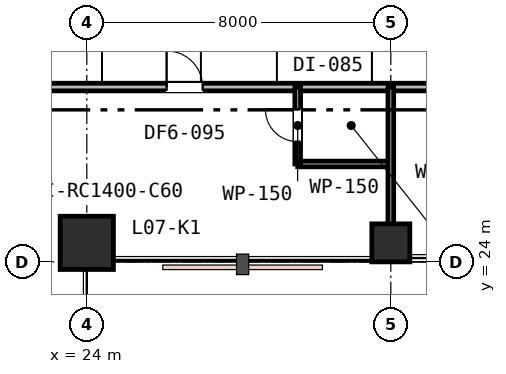
"""IFC4 building model, lengths in metres.
Left out: names, types, materials, properties, quantities, classifications, styles, units other than length and angle.
Written with IfcOpenShell. Run it as: python <this file> out.ifc"""

import sys

from ifc_helpers import new_model, si_unit, direction, frame, frame_2d, origin, origin_2d, place, context, subcontext, project, spatial, rectangle, extrude, element, fill, save


model = new_model("IFC4")
c1 = context("Model", 3, precision=1e-05, world=origin(), true_north=direction((0.0, 1.0)))
c2 = subcontext(c1, "Body", "Model", "MODEL_VIEW")
j1 = project(units=[si_unit("LENGTHUNIT", "METRE"), si_unit("PLANEANGLEUNIT", "RADIAN")], contexts=[c1])
p1 = place(None, origin())
s1 = spatial("IfcSite", under=j1, at=p1, CompositionType="ELEMENT")
p2 = place(p1, origin())
s2 = spatial("IfcBuilding", under=s1, at=p2, CompositionType="ELEMENT")
p3 = place(p2, frame((0.0, 0.0, 33.0)))
s3 = spatial("IfcBuildingStorey", under=s2, at=p3, CompositionType="ELEMENT", Elevation=33.0)
p4 = place(p3, frame((24.0, 24.5, 0.0), z_axis=(0.0, 0.0, 1.0), x_axis=(1.0, 0.0, 0.0)))
e1 = element("IfcColumn", 1, at=p4, inside=s3, PredefinedType="COLUMN", context=c2, shape_type="SweptSolid", body=[
    extrude(rectangle(XDim=1.4, YDim=1.4, at=origin_2d()), origin(), (0.0, 0.0, 1.0), 3.6),
])
p5 = place(p3, frame((32.0, 24.5, 0.0), z_axis=(0.0, 0.0, 1.0), x_axis=(1.0, 0.0, 0.0)))
e2 = element("IfcColumn", 2, at=p5, inside=s3, PredefinedType="COLUMN", context=c2, shape_type="SweptSolid", body=[
    extrude(rectangle(XDim=1.0, YDim=1.0, at=origin_2d()), origin(), (0.0, 0.0, 1.0), 3.6),
])
p6 = place(p3, frame((13.8, 28.6, 0.0), z_axis=(0.0, 0.0, 1.0), x_axis=(1.0, 0.0, 0.0)))
e3 = element("IfcWall", 3, at=p6, inside=s3, PredefinedType="PARTITIONING", context=c2, shape_type="SweptSolid", body=[
    extrude(rectangle(XDim=36.6, YDim=0.2, at=frame_2d((18.3, 0.0))), origin(), (0.0, 0.0, 1.0), 2.68),
])
p7 = place(p6, frame((12.3, 0.0, 0.0)))
e4 = element("IfcOpeningElement", 4, at=p7, cuts=e3, PredefinedType="OPENING", context=c2, shape_type="SweptSolid", body=[
    extrude(rectangle(XDim=0.95, YDim=2.15, at=frame_2d((0.475, 1.075))), frame((0.0, 0.11, 0.0), z_axis=(0.0, -1.0, 0.0), x_axis=(1.0, 0.0, 0.0)), (0.0, 0.0, 1.0), 0.22),
])
p8 = place(p6, frame((20.075, 0.0, 0.0)))
e5 = element("IfcOpeningElement", 5, at=p8, cuts=e3, PredefinedType="OPENING", context=c2, shape_type="SweptSolid", body=[
    extrude(rectangle(XDim=0.95, YDim=2.15, at=frame_2d((0.475, 1.075))), frame((0.0, 0.11, 0.0), z_axis=(0.0, -1.0, 0.0), x_axis=(1.0, 0.0, 0.0)), (0.0, 0.0, 1.0), 0.22),
])
p9 = place(p6, frame((26.829, 0.0, 0.0)))
e6 = element("IfcOpeningElement", 6, at=p9, cuts=e3, PredefinedType="OPENING", context=c2, shape_type="SweptSolid", body=[
    extrude(rectangle(XDim=0.95, YDim=2.15, at=frame_2d((0.475, 1.075))), frame((0.0, 0.11, 0.0), z_axis=(0.0, -1.0, 0.0), x_axis=(1.0, 0.0, 0.0)), (0.0, 0.0, 1.0), 0.22),
])
p10 = place(p6, frame((32.669, 0.0, 0.0)))
e7 = element("IfcOpeningElement", 7, at=p10, cuts=e3, PredefinedType="OPENING", context=c2, shape_type="SweptSolid", body=[
    extrude(rectangle(XDim=0.95, YDim=2.15, at=frame_2d((0.475, 1.075))), frame((0.0, 0.11, 0.0), z_axis=(0.0, -1.0, 0.0), x_axis=(1.0, 0.0, 0.0)), (0.0, 0.0, 1.0), 0.22),
])
p11 = place(p3, frame((29.55, 26.576, 0.0), z_axis=(0.0, 0.0, 1.0), x_axis=(1.0, 0.0, 0.0)))
e8 = element("IfcWall", 8, at=p11, inside=s3, PredefinedType="PARTITIONING", context=c2, shape_type="SweptSolid", body=[
    extrude(rectangle(XDim=2.45, YDim=0.15, at=frame_2d((1.225, 0.0))), origin(), (0.0, 0.0, 1.0), 3.33),
])
p12 = place(p3, frame((29.55, 26.576, 0.0), z_axis=(0.0, 0.0, 1.0), x_axis=(0.0, 1.0, 0.0)))
e9 = element("IfcWall", 9, at=p12, inside=s3, PredefinedType="PARTITIONING", context=c2, shape_type="SweptSolid", body=[
    extrude(rectangle(XDim=2.024, YDim=0.15, at=frame_2d((1.012, 0.0))), origin(), (0.0, 0.0, 1.0), 3.33),
])
p13 = place(p12, frame((0.587, 0.0, 0.0)))
e10 = element("IfcOpeningElement", 10, at=p13, cuts=e9, PredefinedType="OPENING", context=c2, shape_type="SweptSolid", body=[
    extrude(rectangle(XDim=0.85, YDim=2.15, at=frame_2d((0.425, 1.075))), frame((0.0, 0.085, 0.0), z_axis=(0.0, -1.0, 0.0), x_axis=(1.0, 0.0, 0.0)), (0.0, 0.0, 1.0), 0.17),
])
p14 = place(p3, frame((32.0, 28.6, 0.0), z_axis=(0.0, 0.0, 1.0), x_axis=(0.0, -1.0, 0.0)))
e11 = element("IfcWall", 11, at=p14, inside=s3, PredefinedType="PARTITIONING", context=c2, shape_type="SweptSolid", body=[
    extrude(rectangle(XDim=4.5, YDim=0.15, at=frame_2d((2.25, 0.0))), origin(), (0.0, 0.0, 1.0), 2.87),
])
p15 = place(p7, origin())
e12 = element("IfcDoor", 12, at=p15, inside=s3, OperationType="SINGLE_SWING_LEFT", PredefinedType="DOOR", context=c2, shape_type="SweptSolid", body=[
    extrude(rectangle(XDim=0.95, YDim=2.15, at=frame_2d((0.475, 1.075))), frame((0.0, 0.025, 0.0), z_axis=(0.0, -1.0, 0.0), x_axis=(1.0, 0.0, 0.0)), (0.0, 0.0, 1.0), 0.05),
])
fill(e4, e12)
p16 = place(p13, origin())
e13 = element("IfcDoor", 13, at=p16, inside=s3, OperationType="SINGLE_SWING_RIGHT", PredefinedType="DOOR", context=c2, shape_type="SweptSolid", body=[
    extrude(rectangle(XDim=0.85, YDim=2.15, at=frame_2d((0.425, 1.075))), frame((0.0, 0.025, 0.0), z_axis=(0.0, -1.0, 0.0), x_axis=(1.0, 0.0, 0.0)), (0.0, 0.0, 1.0), 0.05),
])
fill(e10, e13)
save(model, sys.argv[1])
